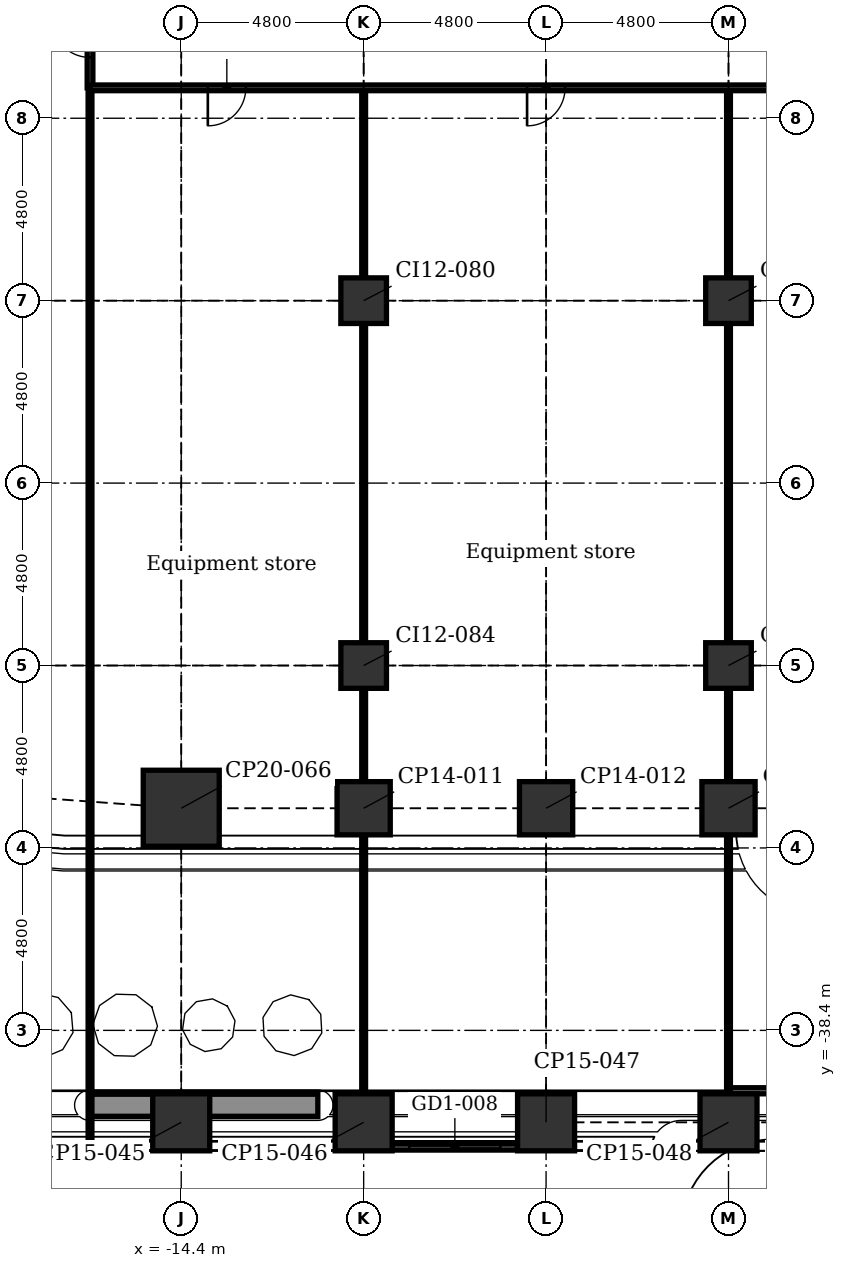
"""IFC4 building model, lengths in metres.
Left out: names, types, materials, properties, quantities, classifications, styles, units other than length and angle.
Written with IfcOpenShell. Run it as: python <this file> out.ifc"""

import sys

from ifc_helpers import new_model, si_unit, direction, frame, frame_2d, origin, origin_2d, place, context, subcontext, project, spatial, rectangle, extrude, element, fill, save


model = new_model("IFC4")
c1 = context("Model", 3, precision=1e-05, world=origin(), true_north=direction((0.0, 1.0)))
c2 = subcontext(c1, "Body", "Model", "MODEL_VIEW")
j1 = project(units=[si_unit("LENGTHUNIT", "METRE"), si_unit("PLANEANGLEUNIT", "RADIAN")], contexts=[c1])
p1 = place(None, origin())
s1 = spatial("IfcSite", under=j1, at=p1, CompositionType="ELEMENT")
p2 = place(p1, origin())
s2 = spatial("IfcBuilding", under=s1, at=p2, CompositionType="ELEMENT")
p3 = place(p2, frame((0.0, 0.0, 12.4)))
s3 = spatial("IfcBuildingStorey", under=s2, at=p3, CompositionType="ELEMENT", Elevation=12.4)
for number, where, z_axis, x_axis in (
    (1, (0.0, -40.819, -0.3), (0.0, 0.0, 1.0), (1.0, 0.0, 0.0)),
    (2, (-4.8, -40.819, -0.3), (0.0, 0.0, 1.0), (1.0, 0.0, 0.0)),
    (3, (-9.6, -40.819, -0.3), (0.0, 0.0, 1.0), (1.0, 0.0, 0.0)),
    (4, (-14.4, -40.819, -0.3), (0.0, 0.0, 1.0), (1.0, 0.0, 0.0)),
):
    element("IfcColumn", number, at=place(p3, frame(where, z_axis=z_axis, x_axis=x_axis)), inside=s3, PredefinedType="COLUMN", context=c2, shape_type="SweptSolid", body=[
        extrude(rectangle(XDim=1.5, YDim=1.5, at=origin_2d()), origin(), (0.0, 0.0, 1.0), 5.05),
    ])
p4 = place(p3, frame((-14.4, -32.555, -0.3), z_axis=(0.0, 0.0, 1.0), x_axis=(1.0, 0.0, 0.0)))
e5 = element("IfcColumn", 5, at=p4, inside=s3, PredefinedType="COLUMN", context=c2, shape_type="SweptSolid", body=[
    extrude(rectangle(XDim=2.0, YDim=2.0, at=origin_2d()), origin(), (0.0, 0.0, 1.0), 5.05),
])
for number, where, z_axis, x_axis in (
    (6, (0.0, -32.555, -0.3), (0.0, 0.0, 1.0), (1.0, 0.0, 0.0)),
    (7, (-4.8, -32.555, -0.3), (0.0, 0.0, 1.0), (1.0, 0.0, 0.0)),
    (8, (-9.6, -32.555, -0.3), (0.0, 0.0, 1.0), (1.0, 0.0, 0.0)),
):
    element("IfcColumn", number, at=place(p3, frame(where, z_axis=z_axis, x_axis=x_axis)), inside=s3, PredefinedType="COLUMN", context=c2, shape_type="SweptSolid", body=[
        extrude(rectangle(XDim=1.4, YDim=1.4, at=origin_2d()), origin(), (0.0, 0.0, 1.0), 5.05),
    ])
for number, where, z_axis, x_axis in (
    (9, (-9.6, -28.8, -0.3), (0.0, 0.0, 1.0), (1.0, 0.0, 0.0)),
    (10, (-9.6, -19.2, -0.3), (0.0, 0.0, 1.0), (1.0, 0.0, 0.0)),
    (11, (0.0, -28.8, -0.3), (0.0, 0.0, 1.0), (1.0, 0.0, 0.0)),
    (12, (0.0, -19.2, -0.3), (0.0, 0.0, 1.0), (1.0, 0.0, 0.0)),
):
    element("IfcColumn", number, at=place(p3, frame(where, z_axis=z_axis, x_axis=x_axis)), inside=s3, PredefinedType="COLUMN", context=c2, shape_type="SweptSolid", body=[
        extrude(rectangle(XDim=1.2, YDim=1.2, at=origin_2d()), origin(), (0.0, 0.0, 1.0), 5.05),
    ])
p5 = place(p3, frame((4.77, -39.989, 0.0), z_axis=(0.0, 0.0, 1.0), x_axis=(-1.0, 0.0, 0.0)))
e13 = element("IfcWall", 13, at=p5, inside=s3, PredefinedType="PARTITIONING", context=c2, shape_type="SweptSolid", body=[
    extrude(rectangle(XDim=4.74, YDim=0.16, at=frame_2d((2.37, 0.0))), origin(), (0.0, 0.0, 1.0), 4.7),
])
p6 = place(p5, frame((1.17, 0.0, 0.0)))
e14 = element("IfcOpeningElement", 14, at=p6, cuts=e13, PredefinedType="OPENING", context=c2, shape_type="SweptSolid", body=[
    extrude(rectangle(XDim=2.4, YDim=2.4, at=frame_2d((1.2, 1.2))), frame((0.0, 0.09, 0.0), z_axis=(0.0, -1.0, 0.0), x_axis=(1.0, 0.0, 0.0)), (0.0, 0.0, 1.0), 0.18),
])
p7 = place(p3, frame((-5.552, -41.469, 0.0), z_axis=(0.0, 0.0, 1.0), x_axis=(-1.0, 0.0, 0.0)))
e15 = element("IfcWall", 15, at=p7, inside=s3, PredefinedType="PARTITIONING", context=c2, shape_type="SweptSolid", body=[
    extrude(rectangle(XDim=3.296, YDim=0.16, at=frame_2d((1.648, 0.0))), origin(), (0.0, 0.0, 1.0), 4.7),
])
p8 = place(p7, frame((0.448, 0.0, 0.0)))
e16 = element("IfcOpeningElement", 16, at=p8, cuts=e15, PredefinedType="OPENING", context=c2, shape_type="SweptSolid", body=[
    extrude(rectangle(XDim=2.4, YDim=2.4, at=frame_2d((1.2, 1.2))), frame((0.0, 0.09, 0.0), z_axis=(0.0, -1.0, 0.0), x_axis=(1.0, 0.0, 0.0)), (0.0, 0.0, 1.0), 0.18),
])
p9 = place(p3, frame((-10.806, -40.369, 5.0), z_axis=(0.0, 0.0, 1.0), x_axis=(-1.0, 0.0, 0.0)))
e17 = element("IfcWall", 17, at=p9, inside=s3, PredefinedType="USERDEFINED", context=c2, shape_type="SweptSolid", body=[
    extrude(rectangle(XDim=6.0, YDim=0.6, at=frame_2d((3.0, 0.0))), origin(), (0.0, 0.0, 1.0), 0.7),
])
p10 = place(p3, frame((0.0, -41.399, 0.0), z_axis=(0.0, 0.0, 1.0), x_axis=(0.0, 1.0, 0.0)))
e18 = element("IfcWall", 18, at=p10, inside=s3, PredefinedType="PARTITIONING", context=c2, shape_type="SweptSolid", body=[
    extrude(rectangle(XDim=9.504, YDim=0.1, at=frame_2d((4.752, 0.0))), origin(), (0.0, 0.0, 1.0), 4.7),
])
p11 = place(p3, frame((0.0, -31.896, 0.0), z_axis=(0.0, 0.0, 1.0), x_axis=(0.0, 1.0, 0.0)))
e19 = element("IfcWall", 19, at=p11, inside=s3, PredefinedType="PARTITIONING", context=c2, shape_type="SweptSolid", body=[
    extrude(rectangle(XDim=2.535, YDim=0.1, at=frame_2d((1.268, 0.0))), origin(), (0.0, 0.0, 1.0), 4.44),
])
p12 = place(p3, frame((0.0, -29.36, 0.0), z_axis=(0.0, 0.0, 1.0), x_axis=(0.0, 1.0, 0.0)))
e20 = element("IfcWall", 20, at=p12, inside=s3, PredefinedType="PARTITIONING", context=c2, shape_type="SweptSolid", body=[
    extrude(rectangle(XDim=1.12, YDim=0.1, at=frame_2d((0.56, 0.0))), origin(), (0.0, 0.0, 1.0), 4.7),
])
p13 = place(p3, frame((0.0, -28.24, 0.0), z_axis=(0.0, 0.0, 1.0), x_axis=(0.0, 1.0, 0.0)))
e21 = element("IfcWall", 21, at=p13, inside=s3, PredefinedType="PARTITIONING", context=c2, shape_type="SweptSolid", body=[
    extrude(rectangle(XDim=8.48, YDim=0.1, at=frame_2d((4.24, 0.0))), origin(), (0.0, 0.0, 1.0), 4.343),
])
p14 = place(p3, frame((0.0, -19.76, 0.0), z_axis=(0.0, 0.0, 1.0), x_axis=(0.0, 1.0, 0.0)))
e22 = element("IfcWall", 22, at=p14, inside=s3, PredefinedType="PARTITIONING", context=c2, shape_type="SweptSolid", body=[
    extrude(rectangle(XDim=1.12, YDim=0.1, at=frame_2d((0.56, 0.0))), origin(), (0.0, 0.0, 1.0), 4.7),
])
p15 = place(p3, frame((0.0, -18.64, 0.0), z_axis=(0.0, 0.0, 1.0), x_axis=(0.0, 1.0, 0.0)))
e23 = element("IfcWall", 23, at=p15, inside=s3, PredefinedType="PARTITIONING", context=c2, shape_type="SweptSolid", body=[
    extrude(rectangle(XDim=5.04, YDim=0.1, at=frame_2d((2.52, 0.0))), origin(), (0.0, 0.0, 1.0), 4.343),
])
p16 = place(p3, frame((-9.6, -41.399, 0.0), z_axis=(0.0, 0.0, 1.0), x_axis=(0.0, 1.0, 0.0)))
e24 = element("IfcWall", 24, at=p16, inside=s3, PredefinedType="PARTITIONING", context=c2, shape_type="SweptSolid", body=[
    extrude(rectangle(XDim=9.504, YDim=0.1, at=frame_2d((4.752, 0.0))), origin(), (0.0, 0.0, 1.0), 4.7),
])
p17 = place(p3, frame((-9.6, -31.896, 0.0), z_axis=(0.0, 0.0, 1.0), x_axis=(0.0, 1.0, 0.0)))
e25 = element("IfcWall", 25, at=p17, inside=s3, PredefinedType="PARTITIONING", context=c2, shape_type="SweptSolid", body=[
    extrude(rectangle(XDim=2.535, YDim=0.1, at=frame_2d((1.268, 0.0))), origin(), (0.0, 0.0, 1.0), 4.44),
])
p18 = place(p3, frame((-9.6, -29.36, 0.0), z_axis=(0.0, 0.0, 1.0), x_axis=(0.0, 1.0, 0.0)))
e26 = element("IfcWall", 26, at=p18, inside=s3, PredefinedType="PARTITIONING", context=c2, shape_type="SweptSolid", body=[
    extrude(rectangle(XDim=1.12, YDim=0.1, at=frame_2d((0.56, 0.0))), origin(), (0.0, 0.0, 1.0), 4.7),
])
p19 = place(p3, frame((-9.6, -28.24, 0.0), z_axis=(0.0, 0.0, 1.0), x_axis=(0.0, 1.0, 0.0)))
e27 = element("IfcWall", 27, at=p19, inside=s3, PredefinedType="PARTITIONING", context=c2, shape_type="SweptSolid", body=[
    extrude(rectangle(XDim=8.48, YDim=0.1, at=frame_2d((4.24, 0.0))), origin(), (0.0, 0.0, 1.0), 4.343),
])
p20 = place(p3, frame((-9.6, -19.76, 0.0), z_axis=(0.0, 0.0, 1.0), x_axis=(0.0, 1.0, 0.0)))
e28 = element("IfcWall", 28, at=p20, inside=s3, PredefinedType="PARTITIONING", context=c2, shape_type="SweptSolid", body=[
    extrude(rectangle(XDim=1.12, YDim=0.1, at=frame_2d((0.56, 0.0))), origin(), (0.0, 0.0, 1.0), 4.7),
])
p21 = place(p3, frame((-9.6, -18.64, 0.0), z_axis=(0.0, 0.0, 1.0), x_axis=(0.0, 1.0, 0.0)))
e29 = element("IfcWall", 29, at=p21, inside=s3, PredefinedType="PARTITIONING", context=c2, shape_type="SweptSolid", body=[
    extrude(rectangle(XDim=5.04, YDim=0.1, at=frame_2d((2.52, 0.0))), origin(), (0.0, 0.0, 1.0), 4.343),
])
p22 = place(p3, frame((-16.8, -41.399, 0.0), z_axis=(0.0, 0.0, 1.0), x_axis=(0.0, 1.0, 0.0)))
e30 = element("IfcWall", 30, at=p22, inside=s3, PredefinedType="PARTITIONING", context=c2, shape_type="SweptSolid", body=[
    extrude(rectangle(XDim=27.799, YDim=0.1, at=frame_2d((13.899, 0.0))), origin(), (0.0, 0.0, 1.0), 4.7),
])
p23 = place(p3, frame((-16.8, -13.6, 0.0), z_axis=(0.0, 0.0, 1.0), x_axis=(0.0, 1.0, 0.0)))
e31 = element("IfcWall", 31, at=p23, inside=s3, PredefinedType="PARTITIONING", context=c2, shape_type="SweptSolid", body=[
    extrude(rectangle(XDim=9.65, YDim=0.15, at=frame_2d((4.825, 0.0))), origin(), (0.0, 0.0, 1.0), 4.7),
])
p24 = place(p23, frame((0.8, 0.0, 0.0)))
e32 = element("IfcOpeningElement", 32, at=p24, cuts=e31, PredefinedType="OPENING", context=c2, shape_type="SweptSolid", body=[
    extrude(rectangle(XDim=1.0, YDim=2.1, at=frame_2d((0.5, 1.05))), frame((0.0, 0.085, 0.0), z_axis=(0.0, -1.0, 0.0), x_axis=(1.0, 0.0, 0.0)), (0.0, 0.0, 1.0), 0.17),
])
p25 = place(p23, frame((6.2, 0.0, 0.0)))
e33 = element("IfcOpeningElement", 33, at=p25, cuts=e31, PredefinedType="OPENING", context=c2, shape_type="SweptSolid", body=[
    extrude(rectangle(XDim=1.0, YDim=2.1, at=frame_2d((0.5, 1.05))), frame((0.0, 0.085, 0.0), z_axis=(0.0, -1.0, 0.0), x_axis=(1.0, 0.0, 0.0)), (0.0, 0.0, 1.0), 0.17),
])
p26 = place(p3, frame((-16.8, -13.6, 0.0), z_axis=(0.0, 0.0, 1.0), x_axis=(1.0, 0.0, 0.0)))
e34 = element("IfcWall", 34, at=p26, inside=s3, PredefinedType="PARTITIONING", context=c2, shape_type="SweptSolid", body=[
    extrude(rectangle(XDim=33.6, YDim=0.15, at=frame_2d((16.8, 0.0))), origin(), (0.0, 0.0, 1.0), 4.7),
])
p27 = place(p26, frame((3.1, 0.0, 0.0)))
e35 = element("IfcOpeningElement", 35, at=p27, cuts=e34, PredefinedType="OPENING", context=c2, shape_type="SweptSolid", body=[
    extrude(rectangle(XDim=1.0, YDim=2.1, at=frame_2d((0.5, 1.05))), frame((0.0, 0.085, 0.0), z_axis=(0.0, -1.0, 0.0), x_axis=(1.0, 0.0, 0.0)), (0.0, 0.0, 1.0), 0.17),
])
p28 = place(p26, frame((11.5, 0.0, 0.0)))
e36 = element("IfcOpeningElement", 36, at=p28, cuts=e34, PredefinedType="OPENING", context=c2, shape_type="SweptSolid", body=[
    extrude(rectangle(XDim=1.0, YDim=2.1, at=frame_2d((0.5, 1.05))), frame((0.0, 0.085, 0.0), z_axis=(0.0, -1.0, 0.0), x_axis=(1.0, 0.0, 0.0)), (0.0, 0.0, 1.0), 0.17),
])
p29 = place(p26, frame((27.1, 0.0, 0.0)))
e37 = element("IfcOpeningElement", 37, at=p29, cuts=e34, PredefinedType="OPENING", context=c2, shape_type="SweptSolid", body=[
    extrude(rectangle(XDim=1.0, YDim=2.1, at=frame_2d((0.5, 1.05))), frame((0.0, 0.085, 0.0), z_axis=(0.0, -1.0, 0.0), x_axis=(1.0, 0.0, 0.0)), (0.0, 0.0, 1.0), 0.17),
])
p30 = place(p26, frame((18.7, 0.0, 0.0)))
e38 = element("IfcOpeningElement", 38, at=p30, cuts=e34, PredefinedType="OPENING", context=c2, shape_type="SweptSolid", body=[
    extrude(rectangle(XDim=1.0, YDim=2.1, at=frame_2d((0.5, 1.05))), frame((0.0, 0.085, 0.0), z_axis=(0.0, -1.0, 0.0), x_axis=(1.0, 0.0, 0.0)), (0.0, 0.0, 1.0), 0.17),
])
p31 = place(p8, origin())
e39 = element("IfcDoor", 39, at=p31, inside=s3, OperationType="DOUBLE_DOOR_SLIDING", PredefinedType="DOOR", context=c2, shape_type="SweptSolid", body=[
    extrude(rectangle(XDim=2.4, YDim=2.4, at=frame_2d((1.2, 1.2))), frame((0.0, 0.025, 0.0), z_axis=(0.0, -1.0, 0.0), x_axis=(1.0, 0.0, 0.0)), (0.0, 0.0, 1.0), 0.05),
])
fill(e16, e39)
p32 = place(p27, frame((1.0, 0.0, 0.0), z_axis=(0.0, 0.0, 1.0), x_axis=(-1.0, 0.0, 0.0)))
e40 = element("IfcDoor", 40, at=p32, inside=s3, OperationType="SINGLE_SWING_LEFT", PredefinedType="DOOR", context=c2, shape_type="SweptSolid", body=[
    extrude(rectangle(XDim=1.0, YDim=2.1, at=frame_2d((0.5, 1.05))), frame((0.0, 0.025, 0.0), z_axis=(0.0, -1.0, 0.0), x_axis=(1.0, 0.0, 0.0)), (0.0, 0.0, 1.0), 0.05),
])
fill(e35, e40)
p33 = place(p28, frame((1.0, 0.0, 0.0), z_axis=(0.0, 0.0, 1.0), x_axis=(-1.0, 0.0, 0.0)))
e41 = element("IfcDoor", 41, at=p33, inside=s3, OperationType="SINGLE_SWING_LEFT", PredefinedType="DOOR", context=c2, shape_type="SweptSolid", body=[
    extrude(rectangle(XDim=1.0, YDim=2.1, at=frame_2d((0.5, 1.05))), frame((0.0, 0.025, 0.0), z_axis=(0.0, -1.0, 0.0), x_axis=(1.0, 0.0, 0.0)), (0.0, 0.0, 1.0), 0.05),
])
fill(e36, e41)
p34 = place(p24, origin())
e42 = element("IfcDoor", 42, at=p34, inside=s3, OperationType="SINGLE_SWING_RIGHT", PredefinedType="DOOR", context=c2, shape_type="SweptSolid", body=[
    extrude(rectangle(XDim=1.0, YDim=2.1, at=frame_2d((0.5, 1.05))), frame((0.0, 0.025, 0.0), z_axis=(0.0, -1.0, 0.0), x_axis=(1.0, 0.0, 0.0)), (0.0, 0.0, 1.0), 0.05),
])
fill(e32, e42)
save(model, sys.argv[1])
